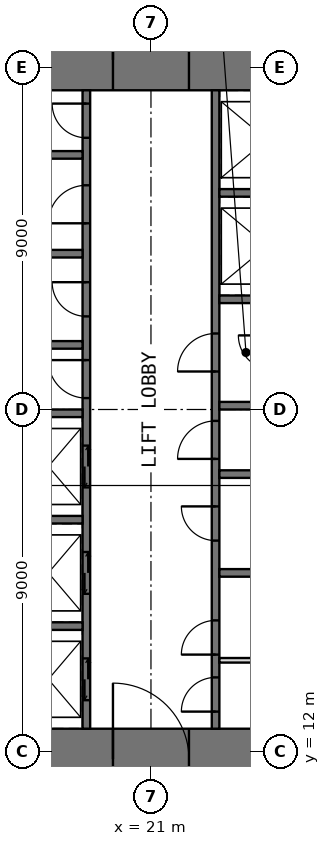
"""IFC4 building model, lengths in metres.
Left out: names, types, materials, properties, quantities, classifications, styles, units other than length and angle.
Written with IfcOpenShell. Run it as: python <this file> out.ifc"""

import sys

from ifc_helpers import new_model, si_unit, direction, frame, frame_2d, origin, place, context, subcontext, project, spatial, rectangle, extrude, element, fill, save


model = new_model("IFC4")
c1 = context("Model", 3, precision=1e-05, world=origin(), true_north=direction((0.0, 1.0)))
c2 = subcontext(c1, "Body", "Model", "MODEL_VIEW")
j1 = project(units=[si_unit("LENGTHUNIT", "METRE"), si_unit("PLANEANGLEUNIT", "RADIAN")], contexts=[c1])
p1 = place(None, origin())
s1 = spatial("IfcSite", under=j1, at=p1, CompositionType="ELEMENT")
p2 = place(p1, origin())
s2 = spatial("IfcBuilding", under=s1, at=p2, CompositionType="ELEMENT")
p3 = place(p2, frame((0.0, 0.0, 148.5)))
s3 = spatial("IfcBuildingStorey", under=s2, at=p3, CompositionType="ELEMENT", Elevation=148.5)
p4 = place(p3, frame((11.0, 11.8, -0.05), z_axis=(0.0, 0.0, 1.0), x_axis=(1.0, 0.0, 0.0)))
e1 = element("IfcWall", 1, at=p4, inside=s3, PredefinedType="SHEAR", context=c2, shape_type="SweptSolid", body=[
    extrude(rectangle(XDim=20.0, YDim=1.6, at=frame_2d((10.0, 0.0))), origin(), (0.0, 0.0, 1.0), 4.0),
])
p5 = place(p4, frame((9.0, 0.0, 0.05)))
e2 = element("IfcOpeningElement", 2, at=p5, cuts=e1, PredefinedType="OPENING", context=c2, shape_type="SweptSolid", body=[
    extrude(rectangle(XDim=2.0, YDim=2.2, at=frame_2d((1.0, 1.1))), frame((0.0, 0.81, 0.0), z_axis=(0.0, -1.0, 0.0), x_axis=(1.0, 0.0, 0.0)), (0.0, 0.0, 1.0), 1.62),
])
p6 = place(p3, frame((11.0, 30.2, -0.05), z_axis=(0.0, 0.0, 1.0), x_axis=(1.0, 0.0, 0.0)))
e3 = element("IfcWall", 3, at=p6, inside=s3, PredefinedType="SHEAR", context=c2, shape_type="SweptSolid", body=[
    extrude(rectangle(XDim=20.0, YDim=1.6, at=frame_2d((10.0, 0.0))), origin(), (0.0, 0.0, 1.0), 4.0),
])
p7 = place(p6, frame((9.0, 0.0, 0.05)))
e4 = element("IfcOpeningElement", 4, at=p7, cuts=e3, PredefinedType="OPENING", context=c2, shape_type="SweptSolid", body=[
    extrude(rectangle(XDim=2.0, YDim=2.2, at=frame_2d((1.0, 1.1))), frame((0.0, 0.81, 0.0), z_axis=(0.0, -1.0, 0.0), x_axis=(1.0, 0.0, 0.0)), (0.0, 0.0, 1.0), 1.62),
])
p8 = place(p3, frame((19.3, 12.6, -0.05), z_axis=(0.0, 0.0, 1.0), x_axis=(0.0, 1.0, 0.0)))
e5 = element("IfcWall", 5, at=p8, inside=s3, PredefinedType="SHEAR", context=c2, shape_type="SweptSolid", body=[
    extrude(rectangle(XDim=16.8, YDim=0.2, at=frame_2d((8.4, 0.0))), origin(), (0.0, 0.0, 1.0), 4.0),
])
p9 = place(p8, frame((8.7, 0.0, 0.05)))
e6 = element("IfcOpeningElement", 6, at=p9, cuts=e5, PredefinedType="OPENING", context=c2, shape_type="SweptSolid", body=[
    extrude(rectangle(XDim=1.0, YDim=2.2, at=frame_2d((0.5, 1.1))), frame((0.0, 0.11, 0.0), z_axis=(0.0, -1.0, 0.0), x_axis=(1.0, 0.0, 0.0)), (0.0, 0.0, 1.0), 0.22),
])
p10 = place(p8, frame((10.85, 0.0, 0.05)))
e7 = element("IfcOpeningElement", 7, at=p10, cuts=e5, PredefinedType="OPENING", context=c2, shape_type="SweptSolid", body=[
    extrude(rectangle(XDim=0.9, YDim=2.2, at=frame_2d((0.45, 1.1))), frame((0.0, 0.11, 0.0), z_axis=(0.0, -1.0, 0.0), x_axis=(1.0, 0.0, 0.0)), (0.0, 0.0, 1.0), 0.22),
])
p11 = place(p8, frame((13.3, 0.0, 0.05)))
e8 = element("IfcOpeningElement", 8, at=p11, cuts=e5, PredefinedType="OPENING", context=c2, shape_type="SweptSolid", body=[
    extrude(rectangle(XDim=1.0, YDim=2.2, at=frame_2d((0.5, 1.1))), frame((0.0, 0.11, 0.0), z_axis=(0.0, -1.0, 0.0), x_axis=(1.0, 0.0, 0.0)), (0.0, 0.0, 1.0), 0.22),
])
p12 = place(p8, frame((15.55, 0.0, 0.05)))
e9 = element("IfcOpeningElement", 9, at=p12, cuts=e5, PredefinedType="OPENING", context=c2, shape_type="SweptSolid", body=[
    extrude(rectangle(XDim=0.9, YDim=2.2, at=frame_2d((0.45, 1.1))), frame((0.0, 0.11, 0.0), z_axis=(0.0, -1.0, 0.0), x_axis=(1.0, 0.0, 0.0)), (0.0, 0.0, 1.0), 0.22),
])
p13 = place(p8, frame((0.75, 0.0, 0.05)))
e10 = element("IfcOpeningElement", 10, at=p13, cuts=e5, PredefinedType="OPENING", context=c2, shape_type="SweptSolid", body=[
    extrude(rectangle(XDim=1.1, YDim=2.2, at=frame_2d((0.55, 1.1))), frame((0.0, 0.11, 0.0), z_axis=(0.0, -1.0, 0.0), x_axis=(1.0, 0.0, 0.0)), (0.0, 0.0, 1.0), 0.22),
])
p14 = place(p8, frame((3.55, 0.0, 0.05)))
e11 = element("IfcOpeningElement", 11, at=p14, cuts=e5, PredefinedType="OPENING", context=c2, shape_type="SweptSolid", body=[
    extrude(rectangle(XDim=1.1, YDim=2.2, at=frame_2d((0.55, 1.1))), frame((0.0, 0.11, 0.0), z_axis=(0.0, -1.0, 0.0), x_axis=(1.0, 0.0, 0.0)), (0.0, 0.0, 1.0), 0.22),
])
p15 = place(p8, frame((6.35, 0.0, 0.05)))
e12 = element("IfcOpeningElement", 12, at=p15, cuts=e5, PredefinedType="OPENING", context=c2, shape_type="SweptSolid", body=[
    extrude(rectangle(XDim=1.1, YDim=2.2, at=frame_2d((0.55, 1.1))), frame((0.0, 0.11, 0.0), z_axis=(0.0, -1.0, 0.0), x_axis=(1.0, 0.0, 0.0)), (0.0, 0.0, 1.0), 0.22),
])
p16 = place(p3, frame((22.7, 12.6, -0.05), z_axis=(0.0, 0.0, 1.0), x_axis=(0.0, 1.0, 0.0)))
e13 = element("IfcWall", 13, at=p16, inside=s3, PredefinedType="SHEAR", context=c2, shape_type="SweptSolid", body=[
    extrude(rectangle(XDim=16.8, YDim=0.2, at=frame_2d((8.4, 0.0))), origin(), (0.0, 0.0, 1.0), 4.0),
])
p17 = place(p16, frame((0.45, 0.0, 0.05)))
e14 = element("IfcOpeningElement", 14, at=p17, cuts=e13, PredefinedType="OPENING", context=c2, shape_type="SweptSolid", body=[
    extrude(rectangle(XDim=0.9, YDim=2.2, at=frame_2d((0.45, 1.1))), frame((0.0, 0.11, 0.0), z_axis=(0.0, -1.0, 0.0), x_axis=(1.0, 0.0, 0.0)), (0.0, 0.0, 1.0), 0.22),
])
p18 = place(p16, frame((7.1, 0.0, 0.05)))
e15 = element("IfcOpeningElement", 15, at=p18, cuts=e13, PredefinedType="OPENING", context=c2, shape_type="SweptSolid", body=[
    extrude(rectangle(XDim=1.0, YDim=2.2, at=frame_2d((0.5, 1.1))), frame((0.0, 0.11, 0.0), z_axis=(0.0, -1.0, 0.0), x_axis=(1.0, 0.0, 0.0)), (0.0, 0.0, 1.0), 0.22),
])
p19 = place(p16, frame((1.95, 0.0, 0.05)))
e16 = element("IfcOpeningElement", 16, at=p19, cuts=e13, PredefinedType="OPENING", context=c2, shape_type="SweptSolid", body=[
    extrude(rectangle(XDim=0.9, YDim=2.2, at=frame_2d((0.45, 1.1))), frame((0.0, 0.11, 0.0), z_axis=(0.0, -1.0, 0.0), x_axis=(1.0, 0.0, 0.0)), (0.0, 0.0, 1.0), 0.22),
])
p20 = place(p16, frame((4.95, 0.0, 0.05)))
e17 = element("IfcOpeningElement", 17, at=p20, cuts=e13, PredefinedType="OPENING", context=c2, shape_type="SweptSolid", body=[
    extrude(rectangle(XDim=0.9, YDim=2.2, at=frame_2d((0.45, 1.1))), frame((0.0, 0.11, 0.0), z_axis=(0.0, -1.0, 0.0), x_axis=(1.0, 0.0, 0.0)), (0.0, 0.0, 1.0), 0.22),
])
p21 = place(p16, frame((9.4, 0.0, 0.05)))
e18 = element("IfcOpeningElement", 18, at=p21, cuts=e13, PredefinedType="OPENING", context=c2, shape_type="SweptSolid", body=[
    extrude(rectangle(XDim=1.0, YDim=2.2, at=frame_2d((0.5, 1.1))), frame((0.0, 0.11, 0.0), z_axis=(0.0, -1.0, 0.0), x_axis=(1.0, 0.0, 0.0)), (0.0, 0.0, 1.0), 0.22),
])
for number, where, z_axis, x_axis in (
    (19, (16.0, 15.3, -0.05), (0.0, 0.0, 1.0), (1.0, 0.0, 0.0)),
    (20, (16.0, 18.1, -0.05), (0.0, 0.0, 1.0), (1.0, 0.0, 0.0)),
    (21, (16.0, 20.9, -0.05), (0.0, 0.0, 1.0), (1.0, 0.0, 0.0)),
    (22, (16.0, 22.7, -0.05), (0.0, 0.0, 1.0), (1.0, 0.0, 0.0)),
    (23, (16.0, 25.1, -0.05), (0.0, 0.0, 1.0), (1.0, 0.0, 0.0)),
    (24, (16.0, 27.7, -0.05), (0.0, 0.0, 1.0), (1.0, 0.0, 0.0)),
    (25, (22.8, 16.7, -0.05), (0.0, 0.0, 1.0), (1.0, 0.0, 0.0)),
    (26, (22.8, 19.3, -0.05), (0.0, 0.0, 1.0), (1.0, 0.0, 0.0)),
    (27, (22.8, 21.1, -0.05), (0.0, 0.0, 1.0), (1.0, 0.0, 0.0)),
    (28, (22.8, 23.9, -0.05), (0.0, 0.0, 1.0), (1.0, 0.0, 0.0)),
    (29, (22.8, 26.7, -0.05), (0.0, 0.0, 1.0), (1.0, 0.0, 0.0)),
):
    element("IfcWall", number, at=place(p3, frame(where, z_axis=z_axis, x_axis=x_axis)), inside=s3, PredefinedType="SHEAR", context=c2, shape_type="SweptSolid", body=[
        extrude(rectangle(XDim=3.2, YDim=0.2, at=frame_2d((1.6, 0.0))), origin(), (0.0, 0.0, 1.0), 4.0),
    ])
p22 = place(p3, frame((22.8, 14.4, 0.0), z_axis=(0.0, 0.0, 1.0), x_axis=(1.0, 0.0, 0.0)))
e30 = element("IfcWall", 30, at=p22, inside=s3, PredefinedType="PARTITIONING", context=c2, shape_type="SweptSolid", body=[
    extrude(rectangle(XDim=3.2, YDim=0.12, at=frame_2d((1.6, 0.0))), origin(), (0.0, 0.0, 1.0), 3.75),
])
p23 = place(p5, origin())
e31 = element("IfcDoor", 31, at=p23, inside=s3, OperationType="DOUBLE_DOOR_SINGLE_SWING", PredefinedType="DOOR", context=c2, shape_type="SweptSolid", body=[
    extrude(rectangle(XDim=2.0, YDim=2.2, at=frame_2d((1.0, 1.1))), frame((0.0, 0.025, 0.0), z_axis=(0.0, -1.0, 0.0), x_axis=(1.0, 0.0, 0.0)), (0.0, 0.0, 1.0), 0.05),
])
fill(e2, e31)
p24 = place(p7, origin())
e32 = element("IfcDoor", 32, at=p24, inside=s3, OperationType="DOUBLE_DOOR_SINGLE_SWING", PredefinedType="DOOR", context=c2, shape_type="SweptSolid", body=[
    extrude(rectangle(XDim=2.0, YDim=2.2, at=frame_2d((1.0, 1.1))), frame((0.0, 0.025, 0.0), z_axis=(0.0, -1.0, 0.0), x_axis=(1.0, 0.0, 0.0)), (0.0, 0.0, 1.0), 0.05),
])
fill(e4, e32)
p25 = place(p17, origin())
e33 = element("IfcDoor", 33, at=p25, inside=s3, OperationType="SINGLE_SWING_LEFT", PredefinedType="DOOR", context=c2, shape_type="SweptSolid", body=[
    extrude(rectangle(XDim=0.9, YDim=2.2, at=frame_2d((0.45, 1.1))), frame((0.0, 0.025, 0.0), z_axis=(0.0, -1.0, 0.0), x_axis=(1.0, 0.0, 0.0)), (0.0, 0.0, 1.0), 0.05),
])
fill(e14, e33)
p26 = place(p9, origin())
e34 = element("IfcDoor", 34, at=p26, inside=s3, OperationType="SINGLE_SWING_RIGHT", PredefinedType="DOOR", context=c2, shape_type="SweptSolid", body=[
    extrude(rectangle(XDim=1.0, YDim=2.2, at=frame_2d((0.5, 1.1))), frame((0.0, 0.025, 0.0), z_axis=(0.0, -1.0, 0.0), x_axis=(1.0, 0.0, 0.0)), (0.0, 0.0, 1.0), 0.05),
])
fill(e6, e34)
p27 = place(p18, origin())
e35 = element("IfcDoor", 35, at=p27, inside=s3, OperationType="SINGLE_SWING_LEFT", PredefinedType="DOOR", context=c2, shape_type="SweptSolid", body=[
    extrude(rectangle(XDim=1.0, YDim=2.2, at=frame_2d((0.5, 1.1))), frame((0.0, 0.025, 0.0), z_axis=(0.0, -1.0, 0.0), x_axis=(1.0, 0.0, 0.0)), (0.0, 0.0, 1.0), 0.05),
])
fill(e15, e35)
p28 = place(p10, origin())
e36 = element("IfcDoor", 36, at=p28, inside=s3, OperationType="SINGLE_SWING_RIGHT", PredefinedType="DOOR", context=c2, shape_type="SweptSolid", body=[
    extrude(rectangle(XDim=0.9, YDim=2.2, at=frame_2d((0.45, 1.1))), frame((0.0, 0.025, 0.0), z_axis=(0.0, -1.0, 0.0), x_axis=(1.0, 0.0, 0.0)), (0.0, 0.0, 1.0), 0.05),
])
fill(e7, e36)
p29 = place(p11, origin())
e37 = element("IfcDoor", 37, at=p29, inside=s3, OperationType="SINGLE_SWING_LEFT", PredefinedType="DOOR", context=c2, shape_type="SweptSolid", body=[
    extrude(rectangle(XDim=1.0, YDim=2.2, at=frame_2d((0.5, 1.1))), frame((0.0, 0.025, 0.0), z_axis=(0.0, -1.0, 0.0), x_axis=(1.0, 0.0, 0.0)), (0.0, 0.0, 1.0), 0.05),
])
fill(e8, e37)
p30 = place(p12, origin())
e38 = element("IfcDoor", 38, at=p30, inside=s3, OperationType="SINGLE_SWING_RIGHT", PredefinedType="DOOR", context=c2, shape_type="SweptSolid", body=[
    extrude(rectangle(XDim=0.9, YDim=2.2, at=frame_2d((0.45, 1.1))), frame((0.0, 0.025, 0.0), z_axis=(0.0, -1.0, 0.0), x_axis=(1.0, 0.0, 0.0)), (0.0, 0.0, 1.0), 0.05),
])
fill(e9, e38)
p31 = place(p19, origin())
e39 = element("IfcDoor", 39, at=p31, inside=s3, OperationType="SINGLE_SWING_LEFT", PredefinedType="DOOR", context=c2, shape_type="SweptSolid", body=[
    extrude(rectangle(XDim=0.9, YDim=2.2, at=frame_2d((0.45, 1.1))), frame((0.0, 0.025, 0.0), z_axis=(0.0, -1.0, 0.0), x_axis=(1.0, 0.0, 0.0)), (0.0, 0.0, 1.0), 0.05),
])
fill(e16, e39)
p32 = place(p20, origin())
e40 = element("IfcDoor", 40, at=p32, inside=s3, OperationType="SINGLE_SWING_RIGHT", PredefinedType="DOOR", context=c2, shape_type="SweptSolid", body=[
    extrude(rectangle(XDim=0.9, YDim=2.2, at=frame_2d((0.45, 1.1))), frame((0.0, 0.025, 0.0), z_axis=(0.0, -1.0, 0.0), x_axis=(1.0, 0.0, 0.0)), (0.0, 0.0, 1.0), 0.05),
])
fill(e17, e40)
p33 = place(p21, origin())
e41 = element("IfcDoor", 41, at=p33, inside=s3, OperationType="SINGLE_SWING_LEFT", PredefinedType="DOOR", context=c2, shape_type="SweptSolid", body=[
    extrude(rectangle(XDim=1.0, YDim=2.2, at=frame_2d((0.5, 1.1))), frame((0.0, 0.025, 0.0), z_axis=(0.0, -1.0, 0.0), x_axis=(1.0, 0.0, 0.0)), (0.0, 0.0, 1.0), 0.05),
])
fill(e18, e41)
p34 = place(p13, origin())
e42 = element("IfcDoor", 42, at=p34, inside=s3, OperationType="DOUBLE_DOOR_SLIDING", PredefinedType="DOOR", context=c2, shape_type="SweptSolid", body=[
    extrude(rectangle(XDim=1.1, YDim=2.2, at=frame_2d((0.55, 1.1))), frame((0.0, 0.025, 0.0), z_axis=(0.0, -1.0, 0.0), x_axis=(1.0, 0.0, 0.0)), (0.0, 0.0, 1.0), 0.05),
])
fill(e10, e42)
p35 = place(p14, origin())
e43 = element("IfcDoor", 43, at=p35, inside=s3, OperationType="DOUBLE_DOOR_SLIDING", PredefinedType="DOOR", context=c2, shape_type="SweptSolid", body=[
    extrude(rectangle(XDim=1.1, YDim=2.2, at=frame_2d((0.55, 1.1))), frame((0.0, 0.025, 0.0), z_axis=(0.0, -1.0, 0.0), x_axis=(1.0, 0.0, 0.0)), (0.0, 0.0, 1.0), 0.05),
])
fill(e11, e43)
p36 = place(p15, origin())
e44 = element("IfcDoor", 44, at=p36, inside=s3, OperationType="DOUBLE_DOOR_SLIDING", PredefinedType="DOOR", context=c2, shape_type="SweptSolid", body=[
    extrude(rectangle(XDim=1.1, YDim=2.2, at=frame_2d((0.55, 1.1))), frame((0.0, 0.025, 0.0), z_axis=(0.0, -1.0, 0.0), x_axis=(1.0, 0.0, 0.0)), (0.0, 0.0, 1.0), 0.05),
])
fill(e12, e44)
save(model, sys.argv[1])
